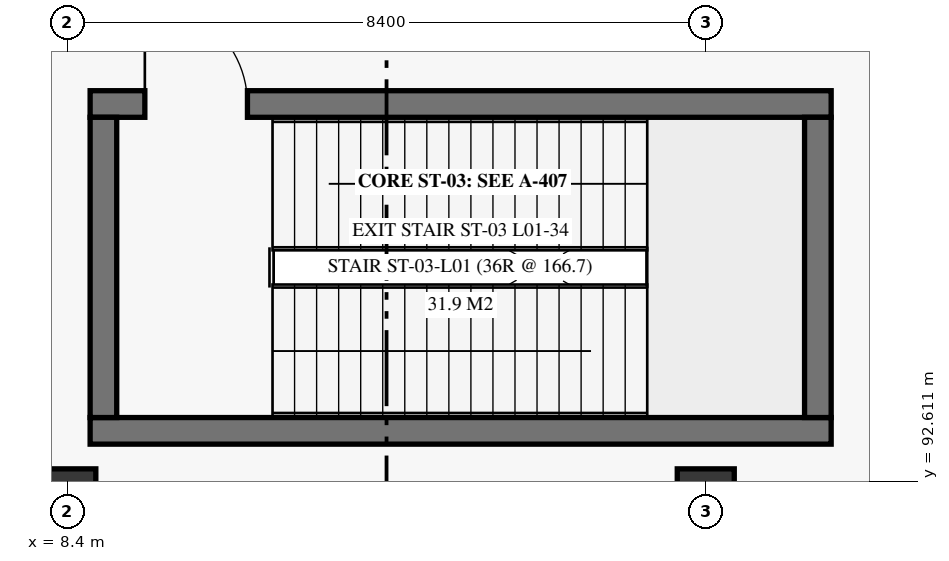
"""IFC4 building model, lengths in metres.
Left out: names, types, materials, properties, quantities, classifications, styles, units other than length and angle.
Written with IfcOpenShell. Run it as: python <this file> out.ifc"""

import sys

from ifc_helpers import new_model, si_unit, direction, frame, frame_2d, origin, origin_2d, place, context, subcontext, project, spatial, rectangle, extrude, element, fill, save


model = new_model("IFC4")
c1 = context("Model", 3, precision=1e-05, world=origin(), true_north=direction((0.0, 1.0)))
c2 = subcontext(c1, "Body", "Model", "MODEL_VIEW")
j1 = project(units=[si_unit("LENGTHUNIT", "METRE"), si_unit("PLANEANGLEUNIT", "RADIAN")], contexts=[c1])
p1 = place(None, origin())
s1 = spatial("IfcSite", under=j1, at=p1, CompositionType="ELEMENT")
p2 = place(p1, origin())
s2 = spatial("IfcBuilding", under=s1, at=p2, CompositionType="ELEMENT")
p3 = place(p2, origin())
s3 = spatial("IfcBuildingStorey", under=s2, at=p3, CompositionType="ELEMENT", Elevation=0.0)
for number, where, z_axis, x_axis in (
    (1, (8.4, 92.4, 0.0), (0.0, 0.0, 1.0), (1.0, 0.0, 0.0)),
    (2, (16.8, 92.4, 0.0), (0.0, 0.0, 1.0), (1.0, 0.0, 0.0)),
):
    element("IfcColumn", number, at=place(p3, frame(where, z_axis=z_axis, x_axis=x_axis)), inside=s3, PredefinedType="COLUMN", context=c2, shape_type="SweptSolid", body=[
        extrude(rectangle(XDim=0.75, YDim=0.75, at=origin_2d()), origin(), (0.0, 0.0, 1.0), 5.7),
    ])
p4 = place(p3, frame((8.7, 93.275, 0.0), z_axis=(0.0, 0.0, 1.0), x_axis=(1.0, 0.0, 0.0)))
e3 = element("IfcWall", 3, at=p4, inside=s3, PredefinedType="SHEAR", context=c2, shape_type="SweptSolid", body=[
    extrude(rectangle(XDim=9.75, YDim=0.35, at=frame_2d((4.875, 0.0))), origin(), (0.0, 0.0, 1.0), 5.7),
])
p5 = place(p3, frame((8.7, 97.575, 0.0), z_axis=(0.0, 0.0, 1.0), x_axis=(1.0, 0.0, 0.0)))
e4 = element("IfcWall", 4, at=p5, inside=s3, PredefinedType="SHEAR", context=c2, shape_type="SweptSolid", body=[
    extrude(rectangle(XDim=9.75, YDim=0.35, at=frame_2d((4.875, 0.0))), origin(), (0.0, 0.0, 1.0), 5.7),
])
p6 = place(p5, frame((0.72, 0.0, 0.0)))
e5 = element("IfcOpeningElement", 5, at=p6, cuts=e4, PredefinedType="OPENING", context=c2, shape_type="SweptSolid", body=[
    extrude(rectangle(XDim=1.35, YDim=2.25, at=frame_2d((0.675, 1.125))), frame((0.0, 0.185, 0.0), z_axis=(0.0, -1.0, 0.0), x_axis=(1.0, 0.0, 0.0)), (0.0, 0.0, 1.0), 0.37),
])
for number, where, z_axis, x_axis in (
    (6, (8.875, 93.45, 0.0), (0.0, 0.0, 1.0), (0.0, 1.0, 0.0)),
    (7, (18.275, 93.45, 0.0), (0.0, 0.0, 1.0), (0.0, 1.0, 0.0)),
):
    element("IfcWall", number, at=place(p3, frame(where, z_axis=z_axis, x_axis=x_axis)), inside=s3, PredefinedType="SHEAR", context=c2, shape_type="SweptSolid", body=[
        extrude(rectangle(XDim=3.95, YDim=0.35, at=frame_2d((1.975, 0.0))), origin(), (0.0, 0.0, 1.0), 5.7),
    ])
p7 = place(p6, origin())
e8 = element("IfcDoor", 8, at=p7, inside=s3, OperationType="SINGLE_SWING_LEFT", PredefinedType="DOOR", context=c2, shape_type="SweptSolid", body=[
    extrude(rectangle(XDim=1.35, YDim=2.25, at=frame_2d((0.675, 1.125))), frame((0.0, 0.025, 0.0), z_axis=(0.0, -1.0, 0.0), x_axis=(1.0, 0.0, 0.0)), (0.0, 0.0, 1.0), 0.05),
])
fill(e5, e8)
save(model, sys.argv[1])
